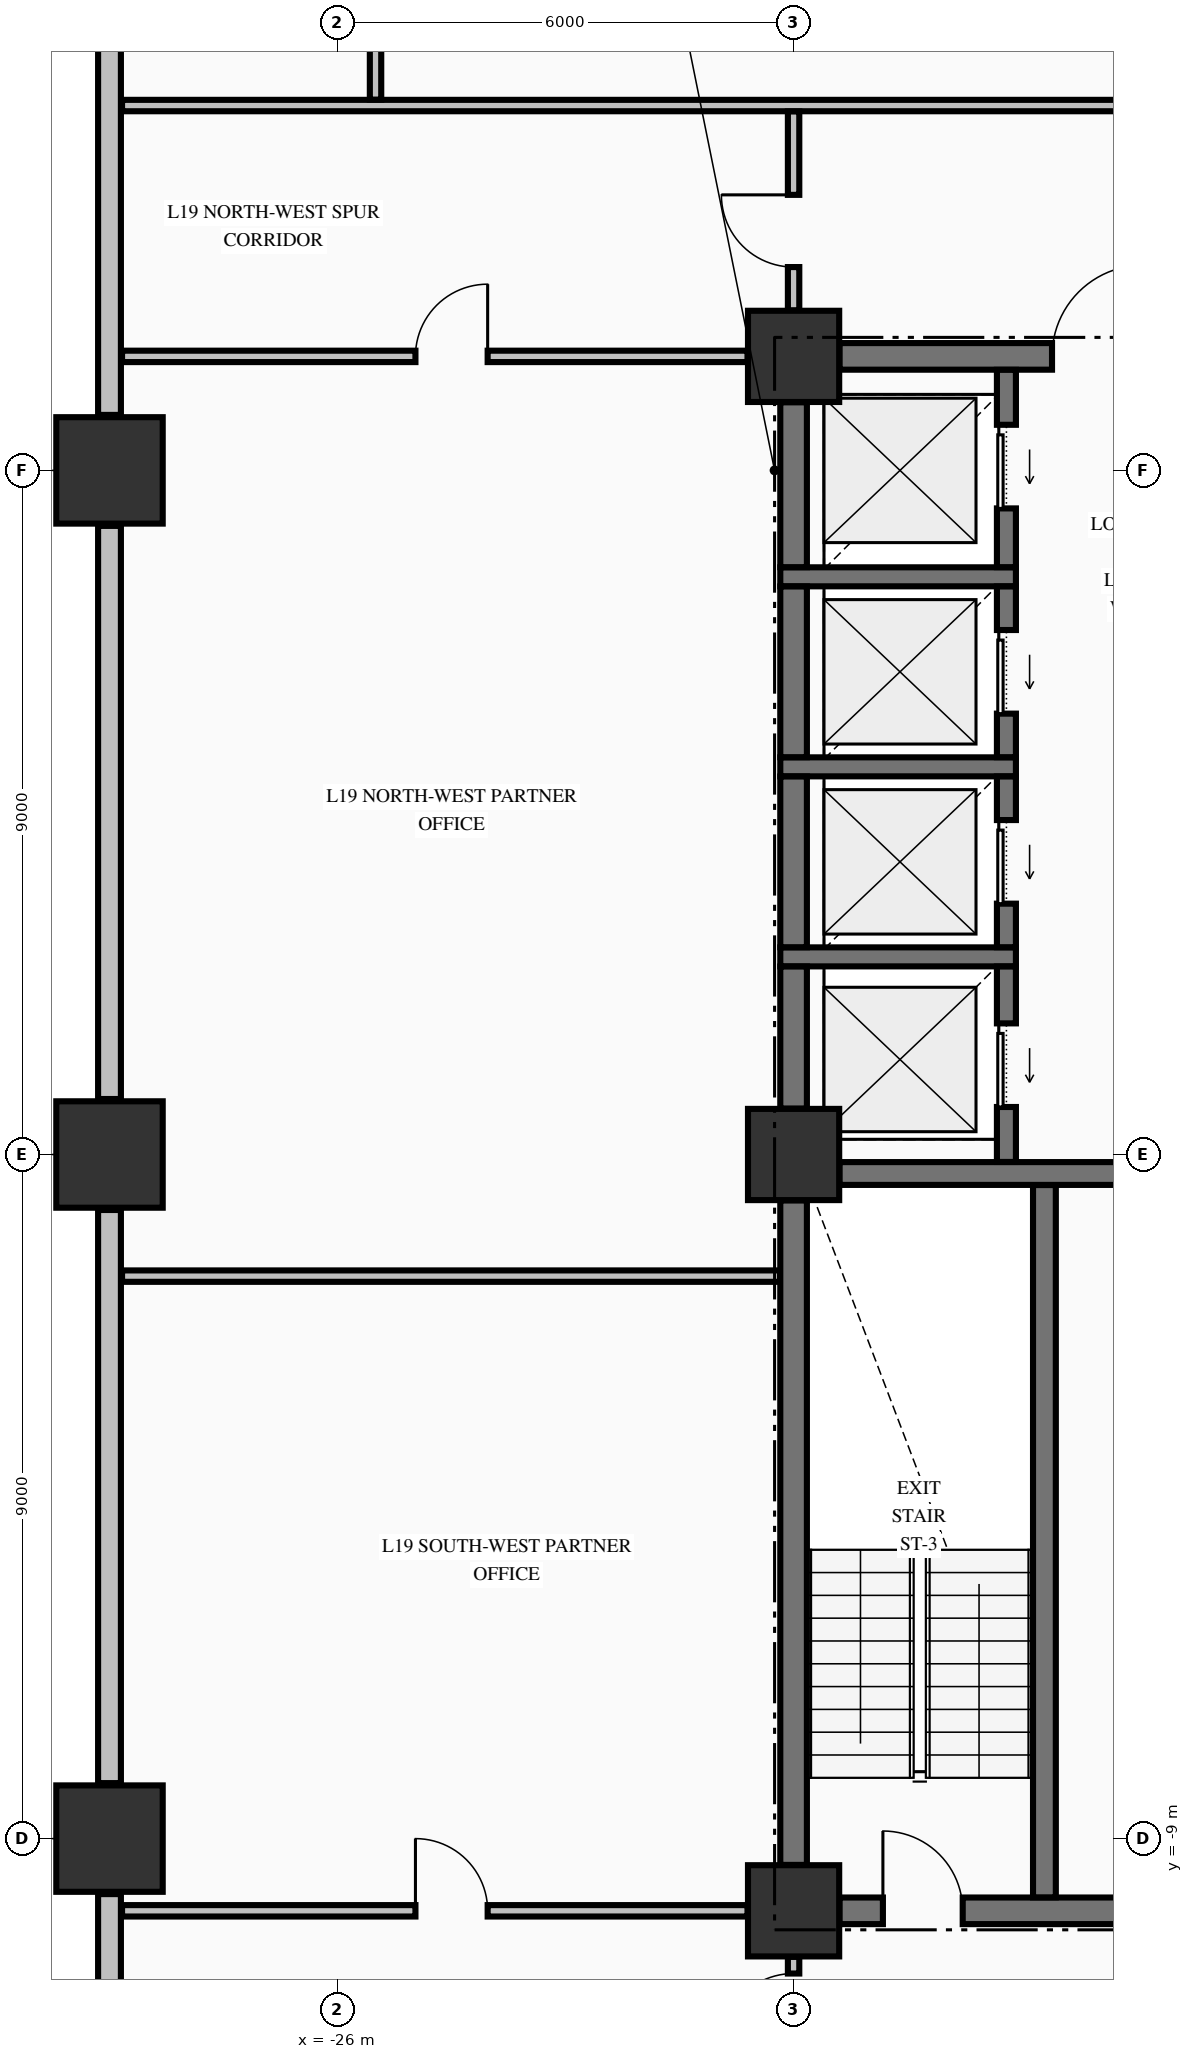
"""IFC4 building model, lengths in metres.
Left out: names, types, materials, properties, quantities, classifications, styles, units other than length and angle.
Written with IfcOpenShell. Run it as: python <this file> out.ifc"""

import sys

from ifc_helpers import new_model, si_unit, direction, frame, frame_2d, origin, origin_2d, place, context, subcontext, project, spatial, rectangle, extrude, element, fill, save


model = new_model("IFC4")
c1 = context("Model", 3, precision=1e-05, world=origin(), true_north=direction((0.0, 1.0)))
c2 = subcontext(c1, "Body", "Model", "MODEL_VIEW")
j1 = project(units=[si_unit("LENGTHUNIT", "METRE"), si_unit("PLANEANGLEUNIT", "RADIAN")], contexts=[c1])
p1 = place(None, origin())
s1 = spatial("IfcSite", under=j1, at=p1, CompositionType="ELEMENT")
p2 = place(p1, origin())
s2 = spatial("IfcBuilding", under=s1, at=p2, CompositionType="ELEMENT")
p3 = place(p2, frame((0.0, 0.0, 78.61)))
s3 = spatial("IfcBuildingStorey", under=s2, at=p3, CompositionType="ELEMENT", Elevation=78.61)
for number, where, z_axis, x_axis in (
    (1, (-29.0, -9.0, -0.25), (0.0, 0.0, 1.0), (1.0, 0.0, 0.0)),
    (2, (-29.0, 0.0, -0.25), (0.0, 0.0, 1.0), (1.0, 0.0, 0.0)),
    (3, (-29.0, 9.0, -0.25), (0.0, 0.0, 1.0), (1.0, 0.0, 0.0)),
):
    element("IfcColumn", number, at=place(p3, frame(where, z_axis=z_axis, x_axis=x_axis)), inside=s3, PredefinedType="COLUMN", context=c2, shape_type="SweptSolid", body=[
        extrude(rectangle(XDim=1.4, YDim=1.4, at=origin_2d()), origin(), (0.0, 0.0, 1.0), 3.395),
    ])
for number, where, z_axis, x_axis in (
    (4, (-20.0, -9.95, -0.25), (0.0, 0.0, 1.0), (1.0, 0.0, 0.0)),
    (5, (-20.0, 10.5, -0.25), (0.0, 0.0, 1.0), (1.0, 0.0, 0.0)),
    (6, (-20.0, 0.0, -0.25), (0.0, 0.0, 1.0), (1.0, 0.0, 0.0)),
):
    element("IfcColumn", number, at=place(p3, frame(where, z_axis=z_axis, x_axis=x_axis)), inside=s3, PredefinedType="COLUMN", context=c2, shape_type="SweptSolid", body=[
        extrude(rectangle(XDim=1.2, YDim=1.2, at=origin_2d()), origin(), (0.0, 0.0, 1.0), 3.395),
    ])
p4 = place(p3, frame((-29.0, -9.73, 0.0), z_axis=(0.0, 0.0, 1.0), x_axis=(0.0, -1.0, 0.0)))
e7 = element("IfcWall", 7, at=p4, inside=s3, PredefinedType="STANDARD", context=c2, shape_type="SweptSolid", body=[
    extrude(rectangle(XDim=12.54, YDim=0.3, at=frame_2d((6.27, 0.0))), origin(), (0.0, 0.0, 1.0), 2.537),
])
for number, where, z_axis, x_axis in (
    (8, (-29.0, -0.73, 0.0), (0.0, 0.0, 1.0), (0.0, -1.0, 0.0)),
    (9, (-29.0, 8.27, 0.0), (0.0, 0.0, 1.0), (0.0, -1.0, 0.0)),
):
    element("IfcWall", number, at=place(p3, frame(where, z_axis=z_axis, x_axis=x_axis)), inside=s3, PredefinedType="STANDARD", context=c2, shape_type="SweptSolid", body=[
        extrude(rectangle(XDim=7.54, YDim=0.3, at=frame_2d((3.77, 0.0))), origin(), (0.0, 0.0, 1.0), 2.537),
    ])
p5 = place(p3, frame((-29.0, 22.27, 0.0), z_axis=(0.0, 0.0, 1.0), x_axis=(0.0, -1.0, 0.0)))
e10 = element("IfcWall", 10, at=p5, inside=s3, PredefinedType="STANDARD", context=c2, shape_type="SweptSolid", body=[
    extrude(rectangle(XDim=12.54, YDim=0.3, at=frame_2d((6.27, 0.0))), origin(), (0.0, 0.0, 1.0), 2.537),
])
p6 = place(p3, frame((-19.396, -9.95, 0.0), z_axis=(0.0, 0.0, 1.0), x_axis=(1.0, 0.0, 0.0)))
e11 = element("IfcWall", 11, at=p6, inside=s3, PredefinedType="SHEAR", context=c2, shape_type="SweptSolid", body=[
    extrude(rectangle(XDim=4.696, YDim=0.35, at=frame_2d((2.348, 0.0))), origin(), (0.0, 0.0, 1.0), 3.145),
])
p7 = place(p6, frame((0.571, 0.0, 0.0)))
e12 = element("IfcOpeningElement", 12, at=p7, cuts=e11, PredefinedType="OPENING", context=c2, shape_type="SweptSolid", body=[
    extrude(rectangle(XDim=1.05, YDim=2.15, at=frame_2d((0.525, 1.075))), frame((0.0, 0.185, 0.0), z_axis=(0.0, -1.0, 0.0), x_axis=(1.0, 0.0, 0.0)), (0.0, 0.0, 1.0), 0.37),
])
p8 = place(p3, frame((-19.396, -0.25, 0.0), z_axis=(0.0, 0.0, 1.0), x_axis=(1.0, 0.0, 0.0)))
e13 = element("IfcWall", 13, at=p8, inside=s3, PredefinedType="SHEAR", context=c2, shape_type="SweptSolid", body=[
    extrude(rectangle(XDim=7.792, YDim=0.3, at=frame_2d((3.896, 0.0))), origin(), (0.0, 0.0, 1.0), 3.145),
])
p9 = place(p8, frame((5.696, 0.0, 0.0)))
e14 = element("IfcOpeningElement", 14, at=p9, cuts=e13, PredefinedType="OPENING", context=c2, shape_type="SweptSolid", body=[
    extrude(rectangle(XDim=1.1, YDim=2.15, at=frame_2d((0.55, 1.075))), frame((0.0, 0.16, 0.0), z_axis=(0.0, -1.0, 0.0), x_axis=(1.0, 0.0, 0.0)), (0.0, 0.0, 1.0), 0.32),
])
for number, where, z_axis, x_axis in (
    (15, (-20.175, 2.6, 0.0), (0.0, 0.0, 1.0), (1.0, 0.0, 0.0)),
    (16, (-20.175, 5.1, 0.0), (0.0, 0.0, 1.0), (1.0, 0.0, 0.0)),
    (17, (-20.175, 7.6, 0.0), (0.0, 0.0, 1.0), (1.0, 0.0, 0.0)),
):
    element("IfcWall", number, at=place(p3, frame(where, z_axis=z_axis, x_axis=x_axis)), inside=s3, PredefinedType="SOLIDWALL", context=c2, shape_type="SweptSolid", body=[
        extrude(rectangle(XDim=3.1, YDim=0.25, at=frame_2d((1.55, 0.0))), origin(), (0.0, 0.0, 1.0), 3.145),
    ])
p10 = place(p3, frame((-19.396, 10.5, 0.0), z_axis=(0.0, 0.0, 1.0), x_axis=(1.0, 0.0, 0.0)))
e18 = element("IfcWall", 18, at=p10, inside=s3, PredefinedType="SHEAR", context=c2, shape_type="SweptSolid", body=[
    extrude(rectangle(XDim=4.696, YDim=0.35, at=frame_2d((2.348, 0.0))), origin(), (0.0, 0.0, 1.0), 3.145),
])
p11 = place(p10, frame((2.796, 0.0, 0.0)))
e19 = element("IfcOpeningElement", 19, at=p11, cuts=e18, PredefinedType="OPENING", context=c2, shape_type="SweptSolid", body=[
    extrude(rectangle(XDim=1.2, YDim=2.15, at=frame_2d((0.6, 1.075))), frame((0.0, 0.185, 0.0), z_axis=(0.0, -1.0, 0.0), x_axis=(1.0, 0.0, 0.0)), (0.0, 0.0, 1.0), 0.37),
])
p12 = place(p3, frame((-28.835, -9.95, 0.0), z_axis=(0.0, 0.0, 1.0), x_axis=(1.0, 0.0, 0.0)))
e20 = element("IfcWall", 20, at=p12, inside=s3, PredefinedType="PARTITIONING", context=c2, shape_type="SweptSolid", body=[
    extrude(rectangle(XDim=8.229, YDim=0.15, at=frame_2d((4.115, 0.0))), origin(), (0.0, 0.0, 1.0), 3.145),
])
p13 = place(p12, frame((3.86, 0.0, 0.0)))
e21 = element("IfcOpeningElement", 21, at=p13, cuts=e20, PredefinedType="OPENING", context=c2, shape_type="SweptSolid", body=[
    extrude(rectangle(XDim=0.95, YDim=2.15, at=frame_2d((0.475, 1.075))), frame((0.0, 0.085, 0.0), z_axis=(0.0, -1.0, 0.0), x_axis=(1.0, 0.0, 0.0)), (0.0, 0.0, 1.0), 0.17),
])
p14 = place(p3, frame((-28.835, -1.6, 0.0), z_axis=(0.0, 0.0, 1.0), x_axis=(1.0, 0.0, 0.0)))
e22 = element("IfcWall", 22, at=p14, inside=s3, PredefinedType="PARTITIONING", context=c2, shape_type="SweptSolid", body=[
    extrude(rectangle(XDim=8.657, YDim=0.15, at=frame_2d((4.329, 0.0))), origin(), (0.0, 0.0, 1.0), 3.145),
])
p15 = place(p3, frame((-28.835, 10.5, 0.0), z_axis=(0.0, 0.0, 1.0), x_axis=(1.0, 0.0, 0.0)))
e23 = element("IfcWall", 23, at=p15, inside=s3, PredefinedType="PARTITIONING", context=c2, shape_type="SweptSolid", body=[
    extrude(rectangle(XDim=8.229, YDim=0.15, at=frame_2d((4.115, 0.0))), origin(), (0.0, 0.0, 1.0), 3.145),
])
p16 = place(p15, frame((3.86, 0.0, 0.0)))
e24 = element("IfcOpeningElement", 24, at=p16, cuts=e23, PredefinedType="OPENING", context=c2, shape_type="SweptSolid", body=[
    extrude(rectangle(XDim=0.95, YDim=2.15, at=frame_2d((0.475, 1.075))), frame((0.0, 0.085, 0.0), z_axis=(0.0, -1.0, 0.0), x_axis=(1.0, 0.0, 0.0)), (0.0, 0.0, 1.0), 0.17),
])
p17 = place(p3, frame((-28.835, 13.8, 0.0), z_axis=(0.0, 0.0, 1.0), x_axis=(1.0, 0.0, 0.0)))
e25 = element("IfcWall", 25, at=p17, inside=s3, PredefinedType="PARTITIONING", context=c2, shape_type="SweptSolid", body=[
    extrude(rectangle(XDim=52.67, YDim=0.15, at=frame_2d((26.335, 0.0))), origin(), (0.0, 0.0, 1.0), 3.145),
])
p18 = place(p17, frame((20.38, 0.0, 0.0)))
e26 = element("IfcOpeningElement", 26, at=p18, cuts=e25, PredefinedType="OPENING", context=c2, shape_type="SweptSolid", body=[
    extrude(rectangle(XDim=1.05, YDim=2.15, at=frame_2d((0.525, 1.075))), frame((0.0, 0.085, 0.0), z_axis=(0.0, -1.0, 0.0), x_axis=(1.0, 0.0, 0.0)), (0.0, 0.0, 1.0), 0.17),
])
p19 = place(p17, frame((33.91, 0.0, 0.0)))
e27 = element("IfcOpeningElement", 27, at=p19, cuts=e25, PredefinedType="OPENING", context=c2, shape_type="SweptSolid", body=[
    extrude(rectangle(XDim=1.05, YDim=2.15, at=frame_2d((0.525, 1.075))), frame((0.0, 0.085, 0.0), z_axis=(0.0, -1.0, 0.0), x_axis=(1.0, 0.0, 0.0)), (0.0, 0.0, 1.0), 0.17),
])
p20 = place(p3, frame((-20.0, -9.346, 0.0), z_axis=(0.0, 0.0, 1.0), x_axis=(0.0, 1.0, 0.0)))
e28 = element("IfcWall", 28, at=p20, inside=s3, PredefinedType="SHEAR", context=c2, shape_type="SweptSolid", body=[
    extrude(rectangle(XDim=8.742, YDim=0.35, at=frame_2d((4.371, 0.0))), origin(), (0.0, 0.0, 1.0), 3.145),
])
p21 = place(p3, frame((-20.0, 0.604, 0.0), z_axis=(0.0, 0.0, 1.0), x_axis=(0.0, 1.0, 0.0)))
e29 = element("IfcWall", 29, at=p21, inside=s3, PredefinedType="SHEAR", context=c2, shape_type="SweptSolid", body=[
    extrude(rectangle(XDim=1.869, YDim=0.35, at=frame_2d((0.935, 0.0))), origin(), (0.0, 0.0, 1.0), 3.145),
])
for number, where, z_axis, x_axis in (
    (30, (-20.0, 2.727, 0.0), (0.0, 0.0, 1.0), (0.0, 1.0, 0.0)),
    (31, (-20.0, 5.227, 0.0), (0.0, 0.0, 1.0), (0.0, 1.0, 0.0)),
):
    element("IfcWall", number, at=place(p3, frame(where, z_axis=z_axis, x_axis=x_axis)), inside=s3, PredefinedType="SHEAR", context=c2, shape_type="SweptSolid", body=[
        extrude(rectangle(XDim=2.246, YDim=0.35, at=frame_2d((1.123, 0.0))), origin(), (0.0, 0.0, 1.0), 3.145),
    ])
p22 = place(p3, frame((-20.0, 7.727, 0.0), z_axis=(0.0, 0.0, 1.0), x_axis=(0.0, 1.0, 0.0)))
e32 = element("IfcWall", 32, at=p22, inside=s3, PredefinedType="SHEAR", context=c2, shape_type="SweptSolid", body=[
    extrude(rectangle(XDim=2.169, YDim=0.35, at=frame_2d((1.084, 0.0))), origin(), (0.0, 0.0, 1.0), 3.145),
])
p23 = place(p3, frame((-17.2, -0.098, 0.0), z_axis=(0.0, 0.0, 1.0), x_axis=(0.0, 1.0, 0.0)))
e33 = element("IfcWall", 33, at=p23, inside=s3, PredefinedType="SOLIDWALL", context=c2, shape_type="SweptSolid", body=[
    extrude(rectangle(XDim=2.571, YDim=0.25, at=frame_2d((1.285, 0.0))), origin(), (0.0, 0.0, 1.0), 3.145),
])
p24 = place(p23, frame((0.723, 0.0, 0.0)))
e34 = element("IfcOpeningElement", 34, at=p24, cuts=e33, PredefinedType="OPENING", context=c2, shape_type="SweptSolid", body=[
    extrude(rectangle(XDim=1.1, YDim=2.2, at=frame_2d((0.55, 1.1))), frame((0.0, 0.135, 0.0), z_axis=(0.0, -1.0, 0.0), x_axis=(1.0, 0.0, 0.0)), (0.0, 0.0, 1.0), 0.27),
])
p25 = place(p3, frame((-17.2, 2.727, 0.0), z_axis=(0.0, 0.0, 1.0), x_axis=(0.0, 1.0, 0.0)))
e35 = element("IfcWall", 35, at=p25, inside=s3, PredefinedType="SOLIDWALL", context=c2, shape_type="SweptSolid", body=[
    extrude(rectangle(XDim=2.246, YDim=0.25, at=frame_2d((1.123, 0.0))), origin(), (0.0, 0.0, 1.0), 3.145),
])
p26 = place(p25, frame((0.573, 0.0, 0.0)))
e36 = element("IfcOpeningElement", 36, at=p26, cuts=e35, PredefinedType="OPENING", context=c2, shape_type="SweptSolid", body=[
    extrude(rectangle(XDim=1.1, YDim=2.2, at=frame_2d((0.55, 1.1))), frame((0.0, 0.135, 0.0), z_axis=(0.0, -1.0, 0.0), x_axis=(1.0, 0.0, 0.0)), (0.0, 0.0, 1.0), 0.27),
])
p27 = place(p3, frame((-17.2, 5.227, 0.0), z_axis=(0.0, 0.0, 1.0), x_axis=(0.0, 1.0, 0.0)))
e37 = element("IfcWall", 37, at=p27, inside=s3, PredefinedType="SOLIDWALL", context=c2, shape_type="SweptSolid", body=[
    extrude(rectangle(XDim=2.246, YDim=0.25, at=frame_2d((1.123, 0.0))), origin(), (0.0, 0.0, 1.0), 3.145),
])
p28 = place(p27, frame((0.573, 0.0, 0.0)))
e38 = element("IfcOpeningElement", 38, at=p28, cuts=e37, PredefinedType="OPENING", context=c2, shape_type="SweptSolid", body=[
    extrude(rectangle(XDim=1.1, YDim=2.2, at=frame_2d((0.55, 1.1))), frame((0.0, 0.135, 0.0), z_axis=(0.0, -1.0, 0.0), x_axis=(1.0, 0.0, 0.0)), (0.0, 0.0, 1.0), 0.27),
])
p29 = place(p3, frame((-17.2, 7.727, 0.0), z_axis=(0.0, 0.0, 1.0), x_axis=(0.0, 1.0, 0.0)))
e39 = element("IfcWall", 39, at=p29, inside=s3, PredefinedType="SOLIDWALL", context=c2, shape_type="SweptSolid", body=[
    extrude(rectangle(XDim=2.596, YDim=0.25, at=frame_2d((1.298, 0.0))), origin(), (0.0, 0.0, 1.0), 3.145),
])
p30 = place(p29, frame((0.773, 0.0, 0.0)))
e40 = element("IfcOpeningElement", 40, at=p30, cuts=e39, PredefinedType="OPENING", context=c2, shape_type="SweptSolid", body=[
    extrude(rectangle(XDim=1.1, YDim=2.2, at=frame_2d((0.55, 1.1))), frame((0.0, 0.135, 0.0), z_axis=(0.0, -1.0, 0.0), x_axis=(1.0, 0.0, 0.0)), (0.0, 0.0, 1.0), 0.27),
])
p31 = place(p3, frame((-16.7, -9.773, 0.0), z_axis=(0.0, 0.0, 1.0), x_axis=(0.0, 1.0, 0.0)))
e41 = element("IfcWall", 41, at=p31, inside=s3, PredefinedType="SHEAR", context=c2, shape_type="SweptSolid", body=[
    extrude(rectangle(XDim=9.371, YDim=0.3, at=frame_2d((4.686, 0.0))), origin(), (0.0, 0.0, 1.0), 3.145),
])
p32 = place(p3, frame((-25.5, 13.878, 0.0), z_axis=(0.0, 0.0, 1.0), x_axis=(0.0, 1.0, 0.0)))
e42 = element("IfcWall", 42, at=p32, inside=s3, PredefinedType="PARTITIONING", context=c2, shape_type="SweptSolid", body=[
    extrude(rectangle(XDim=8.416, YDim=0.15, at=frame_2d((4.208, 0.0))), origin(), (0.0, 0.0, 1.0), 3.145),
])
p33 = place(p3, frame((-20.0, -12.472, 0.0), z_axis=(0.0, 0.0, 1.0), x_axis=(0.0, 1.0, 0.0)))
e43 = element("IfcWall", 43, at=p33, inside=s3, PredefinedType="PARTITIONING", context=c2, shape_type="SweptSolid", body=[
    extrude(rectangle(XDim=1.916, YDim=0.15, at=frame_2d((0.958, 0.0))), origin(), (0.0, 0.0, 1.0), 2.485),
])
p34 = place(p33, frame((0.747, 0.0, 0.0)))
e44 = element("IfcOpeningElement", 44, at=p34, cuts=e43, PredefinedType="OPENING", context=c2, shape_type="SweptSolid", body=[
    extrude(rectangle(XDim=0.95, YDim=2.15, at=frame_2d((0.475, 1.075))), frame((0.0, 0.085, 0.0), z_axis=(0.0, -1.0, 0.0), x_axis=(1.0, 0.0, 0.0)), (0.0, 0.0, 1.0), 0.17),
])
p35 = place(p3, frame((-20.0, 11.106, 0.0), z_axis=(0.0, 0.0, 1.0), x_axis=(0.0, 1.0, 0.0)))
e45 = element("IfcWall", 45, at=p35, inside=s3, PredefinedType="PARTITIONING", context=c2, shape_type="SweptSolid", body=[
    extrude(rectangle(XDim=2.616, YDim=0.15, at=frame_2d((1.308, 0.0))), origin(), (0.0, 0.0, 1.0), 2.485),
])
p36 = place(p35, frame((0.569, 0.0, 0.0)))
e46 = element("IfcOpeningElement", 46, at=p36, cuts=e45, PredefinedType="OPENING", context=c2, shape_type="SweptSolid", body=[
    extrude(rectangle(XDim=0.95, YDim=2.15, at=frame_2d((0.475, 1.075))), frame((0.0, 0.085, 0.0), z_axis=(0.0, -1.0, 0.0), x_axis=(1.0, 0.0, 0.0)), (0.0, 0.0, 1.0), 0.17),
])
p37 = place(p7, origin())
e47 = element("IfcDoor", 47, at=p37, inside=s3, OperationType="SINGLE_SWING_LEFT", PredefinedType="DOOR", context=c2, shape_type="SweptSolid", body=[
    extrude(rectangle(XDim=1.05, YDim=2.15, at=frame_2d((0.525, 1.075))), frame((0.0, 0.025, 0.0), z_axis=(0.0, -1.0, 0.0), x_axis=(1.0, 0.0, 0.0)), (0.0, 0.0, 1.0), 0.05),
])
fill(e12, e47)
p38 = place(p11, origin())
e48 = element("IfcDoor", 48, at=p38, inside=s3, OperationType="SINGLE_SWING_RIGHT", PredefinedType="DOOR", context=c2, shape_type="SweptSolid", body=[
    extrude(rectangle(XDim=1.2, YDim=2.15, at=frame_2d((0.6, 1.075))), frame((0.0, 0.025, 0.0), z_axis=(0.0, -1.0, 0.0), x_axis=(1.0, 0.0, 0.0)), (0.0, 0.0, 1.0), 0.05),
])
fill(e19, e48)
p39 = place(p24, origin())
e49 = element("IfcDoor", 49, at=p39, inside=s3, OperationType="SLIDING_TO_LEFT", PredefinedType="DOOR", context=c2, shape_type="SweptSolid", body=[
    extrude(rectangle(XDim=1.1, YDim=2.2, at=frame_2d((0.55, 1.1))), frame((0.0, 0.025, 0.0), z_axis=(0.0, -1.0, 0.0), x_axis=(1.0, 0.0, 0.0)), (0.0, 0.0, 1.0), 0.05),
])
fill(e34, e49)
p40 = place(p26, origin())
e50 = element("IfcDoor", 50, at=p40, inside=s3, OperationType="SLIDING_TO_LEFT", PredefinedType="DOOR", context=c2, shape_type="SweptSolid", body=[
    extrude(rectangle(XDim=1.1, YDim=2.2, at=frame_2d((0.55, 1.1))), frame((0.0, 0.025, 0.0), z_axis=(0.0, -1.0, 0.0), x_axis=(1.0, 0.0, 0.0)), (0.0, 0.0, 1.0), 0.05),
])
fill(e36, e50)
p41 = place(p28, origin())
e51 = element("IfcDoor", 51, at=p41, inside=s3, OperationType="SLIDING_TO_LEFT", PredefinedType="DOOR", context=c2, shape_type="SweptSolid", body=[
    extrude(rectangle(XDim=1.1, YDim=2.2, at=frame_2d((0.55, 1.1))), frame((0.0, 0.025, 0.0), z_axis=(0.0, -1.0, 0.0), x_axis=(1.0, 0.0, 0.0)), (0.0, 0.0, 1.0), 0.05),
])
fill(e38, e51)
p42 = place(p30, origin())
e52 = element("IfcDoor", 52, at=p42, inside=s3, OperationType="SLIDING_TO_LEFT", PredefinedType="DOOR", context=c2, shape_type="SweptSolid", body=[
    extrude(rectangle(XDim=1.1, YDim=2.2, at=frame_2d((0.55, 1.1))), frame((0.0, 0.025, 0.0), z_axis=(0.0, -1.0, 0.0), x_axis=(1.0, 0.0, 0.0)), (0.0, 0.0, 1.0), 0.05),
])
fill(e40, e52)
p43 = place(p36, origin())
e53 = element("IfcDoor", 53, at=p43, inside=s3, OperationType="SINGLE_SWING_RIGHT", PredefinedType="DOOR", context=c2, shape_type="SweptSolid", body=[
    extrude(rectangle(XDim=0.95, YDim=2.15, at=frame_2d((0.475, 1.075))), frame((0.0, 0.025, 0.0), z_axis=(0.0, -1.0, 0.0), x_axis=(1.0, 0.0, 0.0)), (0.0, 0.0, 1.0), 0.05),
])
fill(e46, e53)
p44 = place(p34, origin())
e54 = element("IfcDoor", 54, at=p44, inside=s3, OperationType="SINGLE_SWING_LEFT", PredefinedType="DOOR", context=c2, shape_type="SweptSolid", body=[
    extrude(rectangle(XDim=0.95, YDim=2.15, at=frame_2d((0.475, 1.075))), frame((0.0, 0.025, 0.0), z_axis=(0.0, -1.0, 0.0), x_axis=(1.0, 0.0, 0.0)), (0.0, 0.0, 1.0), 0.05),
])
fill(e44, e54)
p45 = place(p16, origin())
e55 = element("IfcDoor", 55, at=p45, inside=s3, OperationType="SINGLE_SWING_RIGHT", PredefinedType="DOOR", context=c2, shape_type="SweptSolid", body=[
    extrude(rectangle(XDim=0.95, YDim=2.15, at=frame_2d((0.475, 1.075))), frame((0.0, 0.025, 0.0), z_axis=(0.0, -1.0, 0.0), x_axis=(1.0, 0.0, 0.0)), (0.0, 0.0, 1.0), 0.05),
])
fill(e24, e55)
p46 = place(p13, origin())
e56 = element("IfcDoor", 56, at=p46, inside=s3, OperationType="SINGLE_SWING_LEFT", PredefinedType="DOOR", context=c2, shape_type="SweptSolid", body=[
    extrude(rectangle(XDim=0.95, YDim=2.15, at=frame_2d((0.475, 1.075))), frame((0.0, 0.025, 0.0), z_axis=(0.0, -1.0, 0.0), x_axis=(1.0, 0.0, 0.0)), (0.0, 0.0, 1.0), 0.05),
])
fill(e21, e56)
save(model, sys.argv[1])
